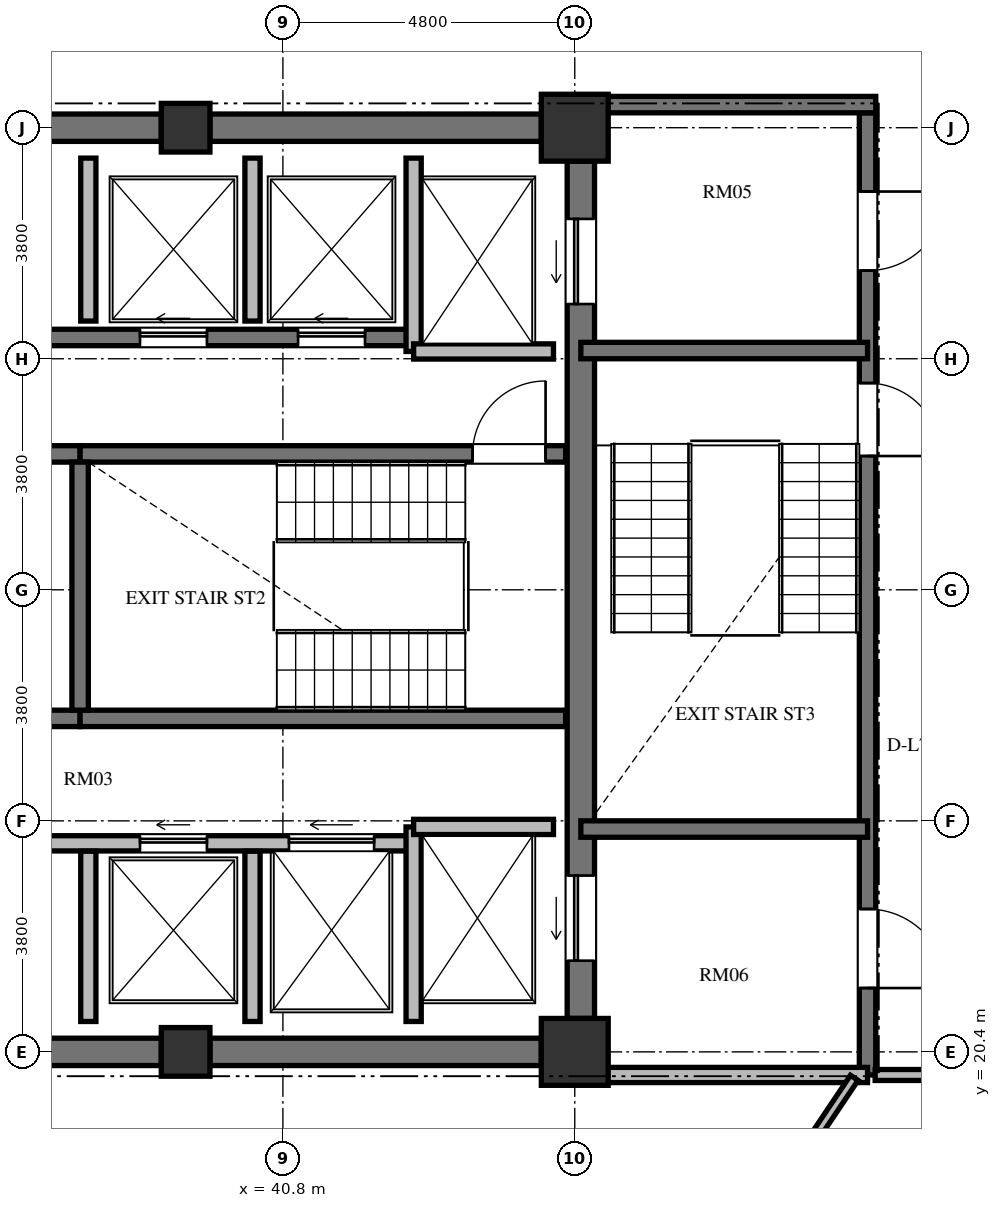
"""IFC4 building model, lengths in metres.
Left out: names, types, materials, properties, quantities, classifications, styles, units other than length and angle.
Written with IfcOpenShell. Run it as: python <this file> out.ifc"""

import sys

from ifc_helpers import new_model, si_unit, direction, frame, frame_2d, origin, origin_2d, place, context, subcontext, project, spatial, rectangle, extrude, element, fill, save


model = new_model("IFC4")
c1 = context("Model", 3, precision=1e-05, world=origin(), true_north=direction((0.0, 1.0)))
c2 = subcontext(c1, "Body", "Model", "MODEL_VIEW")
j1 = project(units=[si_unit("LENGTHUNIT", "METRE"), si_unit("PLANEANGLEUNIT", "RADIAN")], contexts=[c1])
p1 = place(None, origin())
s1 = spatial("IfcSite", under=j1, at=p1, CompositionType="ELEMENT")
p2 = place(p1, origin())
s2 = spatial("IfcBuilding", under=s1, at=p2, CompositionType="ELEMENT")
p3 = place(p2, frame((0.0, 0.0, 287.856)))
s3 = spatial("IfcBuildingStorey", under=s2, at=p3, CompositionType="ELEMENT", Elevation=287.856)
p4 = place(p3, frame((39.2, 20.4, 0.0), z_axis=(0.0, 0.0, 1.0), x_axis=(1.0, 0.0, 0.0)))
e1 = element("IfcColumn", 1, at=p4, inside=s3, PredefinedType="COLUMN", context=c2, shape_type="SweptSolid", body=[
    extrude(rectangle(XDim=0.8, YDim=0.8, at=origin_2d()), origin(), (0.0, 0.0, 1.0), 3.648),
])
for number, where, z_axis, x_axis in (
    (2, (45.6, 20.4, 0.0), (0.0, 0.0, 1.0), (1.0, 0.0, 0.0)),
    (3, (45.6, 35.6, 0.0), (0.0, 0.0, 1.0), (1.0, 0.0, 0.0)),
):
    element("IfcColumn", number, at=place(p3, frame(where, z_axis=z_axis, x_axis=x_axis)), inside=s3, PredefinedType="COLUMN", context=c2, shape_type="SweptSolid", body=[
        extrude(rectangle(XDim=1.1, YDim=1.1, at=origin_2d()), origin(), (0.0, 0.0, 1.0), 3.648),
    ])
p5 = place(p3, frame((39.2, 35.6, 0.0), z_axis=(0.0, 0.0, 1.0), x_axis=(1.0, 0.0, 0.0)))
e4 = element("IfcColumn", 4, at=p5, inside=s3, PredefinedType="COLUMN", context=c2, shape_type="SweptSolid", body=[
    extrude(rectangle(XDim=0.8, YDim=0.8, at=origin_2d()), origin(), (0.0, 0.0, 1.0), 3.648),
])
p6 = place(p3, frame((45.7, 20.95, 0.0), z_axis=(0.0, 0.0, 1.0), x_axis=(0.0, 1.0, 0.0)))
e5 = element("IfcWall", 5, at=p6, inside=s3, PredefinedType="SHEAR", context=c2, shape_type="SweptSolid", body=[
    extrude(rectangle(XDim=14.1, YDim=0.45, at=frame_2d((7.05, 0.0))), origin(), (0.0, 0.0, 1.0), 3.648),
])
p7 = place(p6, frame((11.75, 0.0, 0.0)))
e6 = element("IfcOpeningElement", 6, at=p7, cuts=e5, PredefinedType="OPENING", context=c2, shape_type="SweptSolid", body=[
    extrude(rectangle(XDim=1.4, YDim=2.3, at=frame_2d((0.7, 1.15))), frame((0.0, 0.235, 0.0), z_axis=(0.0, -1.0, 0.0), x_axis=(1.0, 0.0, 0.0)), (0.0, 0.0, 1.0), 0.47),
])
p8 = place(p6, frame((0.95, 0.0, 0.0)))
e7 = element("IfcOpeningElement", 7, at=p8, cuts=e5, PredefinedType="OPENING", context=c2, shape_type="SweptSolid", body=[
    extrude(rectangle(XDim=1.4, YDim=2.3, at=frame_2d((0.7, 1.15))), frame((0.0, 0.235, 0.0), z_axis=(0.0, -1.0, 0.0), x_axis=(1.0, 0.0, 0.0)), (0.0, 0.0, 1.0), 0.47),
])
for number, where, z_axis, x_axis in (
    (8, (33.2, 20.4, 0.0), (0.0, 0.0, 1.0), (1.0, 0.0, 0.0)),
    (9, (33.2, 35.6, 0.0), (0.0, 0.0, 1.0), (1.0, 0.0, 0.0)),
):
    element("IfcWall", number, at=place(p3, frame(where, z_axis=z_axis, x_axis=x_axis)), inside=s3, PredefinedType="SHEAR", context=c2, shape_type="SweptSolid", body=[
        extrude(rectangle(XDim=5.6, YDim=0.45, at=frame_2d((2.8, 0.0))), origin(), (0.0, 0.0, 1.0), 3.648),
    ])
for number, where, z_axis, x_axis in (
    (10, (39.6, 20.4, 0.0), (0.0, 0.0, 1.0), (1.0, 0.0, 0.0)),
    (11, (39.6, 35.6, 0.0), (0.0, 0.0, 1.0), (1.0, 0.0, 0.0)),
):
    element("IfcWall", number, at=place(p3, frame(where, z_axis=z_axis, x_axis=x_axis)), inside=s3, PredefinedType="SHEAR", context=c2, shape_type="SweptSolid", body=[
        extrude(rectangle(XDim=5.45, YDim=0.45, at=frame_2d((2.725, 0.0))), origin(), (0.0, 0.0, 1.0), 3.648),
    ])
p9 = place(p3, frame((34.535, 30.235, 0.0), z_axis=(0.0, 0.0, 1.0), x_axis=(1.0, 0.0, 0.0)))
e12 = element("IfcWall", 12, at=p9, inside=s3, PredefinedType="SHEAR", context=c2, shape_type="SweptSolid", body=[
    extrude(rectangle(XDim=2.93, YDim=0.27, at=frame_2d((1.465, 0.0))), origin(), (0.0, 0.0, 1.0), 3.648),
])
p10 = place(p9, frame((0.965, 0.0, 0.0)))
e13 = element("IfcOpeningElement", 13, at=p10, cuts=e12, PredefinedType="OPENING", context=c2, shape_type="SweptSolid", body=[
    extrude(rectangle(XDim=1.0, YDim=2.1, at=frame_2d((0.5, 1.05))), frame((0.0, 0.145, 0.0), z_axis=(0.0, -1.0, 0.0), x_axis=(1.0, 0.0, 0.0)), (0.0, 0.0, 1.0), 0.29),
])
p11 = place(p3, frame((37.465, 30.235, 0.0), z_axis=(0.0, 0.0, 1.0), x_axis=(1.0, 0.0, 0.0)))
e14 = element("IfcWall", 14, at=p11, inside=s3, PredefinedType="SHEAR", context=c2, shape_type="SweptSolid", body=[
    extrude(rectangle(XDim=7.985, YDim=0.27, at=frame_2d((3.992, 0.0))), origin(), (0.0, 0.0, 1.0), 3.648),
])
p12 = place(p11, frame((6.455, 0.0, 0.0)))
e15 = element("IfcOpeningElement", 15, at=p12, cuts=e14, PredefinedType="OPENING", context=c2, shape_type="SweptSolid", body=[
    extrude(rectangle(XDim=1.2, YDim=2.15, at=frame_2d((0.6, 1.075))), frame((0.0, 0.145, 0.0), z_axis=(0.0, -1.0, 0.0), x_axis=(1.0, 0.0, 0.0)), (0.0, 0.0, 1.0), 0.29),
])
p13 = place(p3, frame((34.535, 25.885, 0.0), z_axis=(0.0, 0.0, 1.0), x_axis=(1.0, 0.0, 0.0)))
e16 = element("IfcWall", 16, at=p13, inside=s3, PredefinedType="SHEAR", context=c2, shape_type="SweptSolid", body=[
    extrude(rectangle(XDim=2.93, YDim=0.27, at=frame_2d((1.465, 0.0))), origin(), (0.0, 0.0, 1.0), 3.648),
])
p14 = place(p3, frame((37.465, 25.885, 0.0), z_axis=(0.0, 0.0, 1.0), x_axis=(1.0, 0.0, 0.0)))
e17 = element("IfcWall", 17, at=p14, inside=s3, PredefinedType="SHEAR", context=c2, shape_type="SweptSolid", body=[
    extrude(rectangle(XDim=7.985, YDim=0.27, at=frame_2d((3.992, 0.0))), origin(), (0.0, 0.0, 1.0), 3.648),
])
p15 = place(p3, frame((37.465, 26.02, 0.0), z_axis=(0.0, 0.0, 1.0), x_axis=(0.0, 1.0, 0.0)))
e18 = element("IfcWall", 18, at=p15, inside=s3, PredefinedType="SHEAR", context=c2, shape_type="SweptSolid", body=[
    extrude(rectangle(XDim=4.08, YDim=0.27, at=frame_2d((2.04, 0.0))), origin(), (0.0, 0.0, 1.0), 3.648),
])
p16 = place(p3, frame((26.55, 32.15, 0.0), z_axis=(0.0, 0.0, 1.0), x_axis=(1.0, 0.0, 0.0)))
e19 = element("IfcWall", 19, at=p16, inside=s3, PredefinedType="SHEAR", context=c2, shape_type="SweptSolid", body=[
    extrude(rectangle(XDim=16.4, YDim=0.27, at=frame_2d((8.2, 0.0))), origin(), (0.0, 0.0, 1.0), 3.648),
])
p17 = place(p16, frame((5.125, 0.0, 0.0)))
e20 = element("IfcOpeningElement", 20, at=p17, cuts=e19, PredefinedType="OPENING", context=c2, shape_type="SweptSolid", body=[
    extrude(rectangle(XDim=1.05, YDim=2.15, at=frame_2d((0.525, 1.075))), frame((0.0, 0.145, 0.0), z_axis=(0.0, -1.0, 0.0), x_axis=(1.0, 0.0, 0.0)), (0.0, 0.0, 1.0), 0.29),
])
p18 = place(p16, frame((11.9, 0.0, 0.0)))
e21 = element("IfcOpeningElement", 21, at=p18, cuts=e19, PredefinedType="OPENING", context=c2, shape_type="SweptSolid", body=[
    extrude(rectangle(XDim=1.1, YDim=2.2, at=frame_2d((0.55, 1.1))), frame((0.0, 0.145, 0.0), z_axis=(0.0, -1.0, 0.0), x_axis=(1.0, 0.0, 0.0)), (0.0, 0.0, 1.0), 0.29),
])
p19 = place(p16, frame((14.5, 0.0, 0.0)))
e22 = element("IfcOpeningElement", 22, at=p19, cuts=e19, PredefinedType="OPENING", context=c2, shape_type="SweptSolid", body=[
    extrude(rectangle(XDim=1.1, YDim=2.2, at=frame_2d((0.55, 1.1))), frame((0.0, 0.145, 0.0), z_axis=(0.0, -1.0, 0.0), x_axis=(1.0, 0.0, 0.0)), (0.0, 0.0, 1.0), 0.29),
])
p20 = place(p3, frame((26.75, 23.83, 0.0), z_axis=(0.0, 0.0, 1.0), x_axis=(1.0, 0.0, 0.0)))
e23 = element("IfcWall", 23, at=p20, inside=s3, PredefinedType="SOLIDWALL", context=c2, shape_type="SweptSolid", body=[
    extrude(rectangle(XDim=16.2, YDim=0.25, at=frame_2d((8.1, 0.0))), origin(), (0.0, 0.0, 1.0), 3.448),
])
p21 = place(p20, frame((4.75, 0.0, 0.0)))
e24 = element("IfcOpeningElement", 24, at=p21, cuts=e23, PredefinedType="OPENING", context=c2, shape_type="SweptSolid", body=[
    extrude(rectangle(XDim=1.4, YDim=2.2, at=frame_2d((0.7, 1.1))), frame((0.0, 0.135, 0.0), z_axis=(0.0, -1.0, 0.0), x_axis=(1.0, 0.0, 0.0)), (0.0, 0.0, 1.0), 0.27),
])
p22 = place(p20, frame((11.7, 0.0, 0.0)))
e25 = element("IfcOpeningElement", 25, at=p22, cuts=e23, PredefinedType="OPENING", context=c2, shape_type="SweptSolid", body=[
    extrude(rectangle(XDim=1.1, YDim=2.2, at=frame_2d((0.55, 1.1))), frame((0.0, 0.135, 0.0), z_axis=(0.0, -1.0, 0.0), x_axis=(1.0, 0.0, 0.0)), (0.0, 0.0, 1.0), 0.27),
])
p23 = place(p20, frame((14.15, 0.0, 0.0)))
e26 = element("IfcOpeningElement", 26, at=p23, cuts=e23, PredefinedType="OPENING", context=c2, shape_type="SweptSolid", body=[
    extrude(rectangle(XDim=1.4, YDim=2.3, at=frame_2d((0.7, 1.15))), frame((0.0, 0.135, 0.0), z_axis=(0.0, -1.0, 0.0), x_axis=(1.0, 0.0, 0.0)), (0.0, 0.0, 1.0), 0.27),
])
p24 = place(p3, frame((42.95, 31.92, 0.0), z_axis=(0.0, 0.0, 1.0), x_axis=(0.0, 1.0, 0.0)))
e27 = element("IfcWall", 27, at=p24, inside=s3, PredefinedType="SOLIDWALL", context=c2, shape_type="SweptSolid", body=[
    extrude(rectangle(XDim=3.18, YDim=0.25, at=frame_2d((1.59, 0.0))), origin(), (0.0, 0.0, 1.0), 3.448),
])
p25 = place(p3, frame((42.95, 31.92, 0.0), z_axis=(0.0, 0.0, 1.0), x_axis=(1.0, 0.0, 0.0)))
e28 = element("IfcWall", 28, at=p25, inside=s3, PredefinedType="SOLIDWALL", context=c2, shape_type="SweptSolid", body=[
    extrude(rectangle(XDim=2.3, YDim=0.25, at=frame_2d((1.15, 0.0))), origin(), (0.0, 0.0, 1.0), 3.448),
])
p26 = place(p3, frame((42.95, 20.9, 0.0), z_axis=(0.0, 0.0, 1.0), x_axis=(0.0, 1.0, 0.0)))
e29 = element("IfcWall", 29, at=p26, inside=s3, PredefinedType="SOLIDWALL", context=c2, shape_type="SweptSolid", body=[
    extrude(rectangle(XDim=3.2, YDim=0.25, at=frame_2d((1.6, 0.0))), origin(), (0.0, 0.0, 1.0), 3.448),
])
p27 = place(p3, frame((42.95, 24.1, 0.0), z_axis=(0.0, 0.0, 1.0), x_axis=(1.0, 0.0, 0.0)))
e30 = element("IfcWall", 30, at=p27, inside=s3, PredefinedType="SOLIDWALL", context=c2, shape_type="SweptSolid", body=[
    extrude(rectangle(XDim=2.3, YDim=0.25, at=frame_2d((1.15, 0.0))), origin(), (0.0, 0.0, 1.0), 3.448),
])
p28 = place(p3, frame((37.6, 32.42, 0.0), z_axis=(0.0, 0.0, 1.0), x_axis=(0.0, 1.0, 0.0)))
e31 = element("IfcWall", 31, at=p28, inside=s3, PredefinedType="SOLIDWALL", context=c2, shape_type="SweptSolid", body=[
    extrude(rectangle(XDim=2.68, YDim=0.25, at=frame_2d((1.34, 0.0))), origin(), (0.0, 0.0, 1.0), 3.448),
])
p29 = place(p3, frame((37.6, 20.9, 0.0), z_axis=(0.0, 0.0, 1.0), x_axis=(0.0, 1.0, 0.0)))
e32 = element("IfcWall", 32, at=p29, inside=s3, PredefinedType="SOLIDWALL", context=c2, shape_type="SweptSolid", body=[
    extrude(rectangle(XDim=2.8, YDim=0.25, at=frame_2d((1.4, 0.0))), origin(), (0.0, 0.0, 1.0), 3.448),
])
p30 = place(p3, frame((40.3, 32.42, 0.0), z_axis=(0.0, 0.0, 1.0), x_axis=(0.0, 1.0, 0.0)))
e33 = element("IfcWall", 33, at=p30, inside=s3, PredefinedType="SOLIDWALL", context=c2, shape_type="SweptSolid", body=[
    extrude(rectangle(XDim=2.68, YDim=0.25, at=frame_2d((1.34, 0.0))), origin(), (0.0, 0.0, 1.0), 3.448),
])
p31 = place(p3, frame((40.3, 20.9, 0.0), z_axis=(0.0, 0.0, 1.0), x_axis=(0.0, 1.0, 0.0)))
e34 = element("IfcWall", 34, at=p31, inside=s3, PredefinedType="SOLIDWALL", context=c2, shape_type="SweptSolid", body=[
    extrude(rectangle(XDim=2.8, YDim=0.25, at=frame_2d((1.4, 0.0))), origin(), (0.0, 0.0, 1.0), 3.448),
])
p32 = place(p3, frame((50.415, 35.845, 0.0), z_axis=(0.0, 0.0, 1.0), x_axis=(0.0, -1.0, 0.0)))
e35 = element("IfcWall", 35, at=p32, inside=s3, PredefinedType="SHEAR", context=c2, shape_type="SweptSolid", body=[
    extrude(rectangle(XDim=15.825, YDim=0.27, at=frame_2d((7.913, 0.0))), origin(), (0.0, 0.0, 1.0), 3.648),
])
p33 = place(p32, frame((4.445, 0.0, 0.0)))
e36 = element("IfcOpeningElement", 36, at=p33, cuts=e35, PredefinedType="OPENING", context=c2, shape_type="SweptSolid", body=[
    extrude(rectangle(XDim=1.2, YDim=2.15, at=frame_2d((0.6, 1.075))), frame((0.0, 0.145, 0.0), z_axis=(0.0, -1.0, 0.0), x_axis=(1.0, 0.0, 0.0)), (0.0, 0.0, 1.0), 0.29),
])
p34 = place(p32, frame((1.295, 0.0, 0.0)))
e37 = element("IfcOpeningElement", 37, at=p34, cuts=e35, PredefinedType="OPENING", context=c2, shape_type="SweptSolid", body=[
    extrude(rectangle(XDim=1.3, YDim=2.2, at=frame_2d((0.65, 1.1))), frame((0.0, 0.145, 0.0), z_axis=(0.0, -1.0, 0.0), x_axis=(1.0, 0.0, 0.0)), (0.0, 0.0, 1.0), 0.29),
])
p35 = place(p32, frame((13.095, 0.0, 0.0)))
e38 = element("IfcOpeningElement", 38, at=p35, cuts=e35, PredefinedType="OPENING", context=c2, shape_type="SweptSolid", body=[
    extrude(rectangle(XDim=1.3, YDim=2.2, at=frame_2d((0.65, 1.1))), frame((0.0, 0.145, 0.0), z_axis=(0.0, -1.0, 0.0), x_axis=(1.0, 0.0, 0.0)), (0.0, 0.0, 1.0), 0.29),
])
p36 = place(p3, frame((45.925, 35.98, 0.0), z_axis=(0.0, 0.0, 1.0), x_axis=(1.0, 0.0, 0.0)))
e39 = element("IfcWall", 39, at=p36, inside=s3, PredefinedType="SHEAR", context=c2, shape_type="SweptSolid", body=[
    extrude(rectangle(XDim=4.625, YDim=0.27, at=frame_2d((2.312, 0.0))), origin(), (0.0, 0.0, 1.0), 3.648),
])
for number, where, z_axis, x_axis in (
    (40, (45.7, 31.935, 0.0), (0.0, 0.0, 1.0), (1.0, 0.0, 0.0)),
    (41, (45.7, 24.065, 0.0), (0.0, 0.0, 1.0), (1.0, 0.0, 0.0)),
):
    element("IfcWall", number, at=place(p3, frame(where, z_axis=z_axis, x_axis=x_axis)), inside=s3, PredefinedType="SHEAR", context=c2, shape_type="SweptSolid", body=[
        extrude(rectangle(XDim=4.715, YDim=0.27, at=frame_2d((2.357, 0.0))), origin(), (0.0, 0.0, 1.0), 3.648),
    ])
p37 = place(p3, frame((45.7, 20.02, 0.0), z_axis=(0.0, 0.0, 1.0), x_axis=(1.0, 0.0, 0.0)))
e42 = element("IfcWall", 42, at=p37, inside=s3, PredefinedType="SOLIDWALL", context=c2, shape_type="SweptSolid", body=[
    extrude(rectangle(XDim=4.715, YDim=0.25, at=frame_2d((2.357, 0.0))), origin(), (0.0, 0.0, 1.0), 3.448),
])
p38 = place(p3, frame((52.358, 20.02, 0.0), z_axis=(0.0, 0.0, 1.0), x_axis=(-1.0, 0.0, 0.0)))
e43 = element("IfcWall", 43, at=p38, inside=s3, PredefinedType="PARTITIONING", context=c2, shape_type="SweptSolid", body=[
    extrude(rectangle(XDim=1.818, YDim=0.18, at=frame_2d((0.909, 0.0))), origin(), (0.0, 0.0, 1.0), 3.448),
])
p39 = place(p3, frame((50.196, 19.973, 0.0), z_axis=(0.0, 0.0, 1.0), x_axis=(-0.557432490255, -0.830222270725, 0.0)))
e44 = element("IfcWall", 44, at=p39, inside=s3, PredefinedType="PARTITIONING", context=c2, shape_type="SweptSolid", body=[
    extrude(rectangle(XDim=5.664, YDim=0.15, at=frame_2d((2.832, 0.0))), origin(), (0.0, 0.0, 1.0), 3.448),
])
p40 = place(p12, origin())
e45 = element("IfcDoor", 45, at=p40, inside=s3, OperationType="SINGLE_SWING_RIGHT", PredefinedType="DOOR", context=c2, shape_type="SweptSolid", body=[
    extrude(rectangle(XDim=1.2, YDim=2.15, at=frame_2d((0.6, 1.075))), frame((0.0, 0.025, 0.0), z_axis=(0.0, -1.0, 0.0), x_axis=(1.0, 0.0, 0.0)), (0.0, 0.0, 1.0), 0.05),
])
fill(e15, e45)
p41 = place(p18, origin())
e46 = element("IfcDoor", 46, at=p41, inside=s3, OperationType="SLIDING_TO_LEFT", PredefinedType="DOOR", context=c2, shape_type="SweptSolid", body=[
    extrude(rectangle(XDim=1.1, YDim=2.2, at=frame_2d((0.55, 1.1))), frame((0.0, 0.025, 0.0), z_axis=(0.0, -1.0, 0.0), x_axis=(1.0, 0.0, 0.0)), (0.0, 0.0, 1.0), 0.05),
])
fill(e21, e46)
p42 = place(p19, origin())
e47 = element("IfcDoor", 47, at=p42, inside=s3, OperationType="SLIDING_TO_LEFT", PredefinedType="DOOR", context=c2, shape_type="SweptSolid", body=[
    extrude(rectangle(XDim=1.1, YDim=2.2, at=frame_2d((0.55, 1.1))), frame((0.0, 0.025, 0.0), z_axis=(0.0, -1.0, 0.0), x_axis=(1.0, 0.0, 0.0)), (0.0, 0.0, 1.0), 0.05),
])
fill(e22, e47)
p43 = place(p22, origin())
e48 = element("IfcDoor", 48, at=p43, inside=s3, OperationType="SLIDING_TO_LEFT", PredefinedType="DOOR", context=c2, shape_type="SweptSolid", body=[
    extrude(rectangle(XDim=1.1, YDim=2.2, at=frame_2d((0.55, 1.1))), frame((0.0, 0.025, 0.0), z_axis=(0.0, -1.0, 0.0), x_axis=(1.0, 0.0, 0.0)), (0.0, 0.0, 1.0), 0.05),
])
fill(e25, e48)
p44 = place(p7, origin())
e49 = element("IfcDoor", 49, at=p44, inside=s3, OperationType="SLIDING_TO_LEFT", PredefinedType="DOOR", context=c2, shape_type="SweptSolid", body=[
    extrude(rectangle(XDim=1.4, YDim=2.3, at=frame_2d((0.7, 1.15))), frame((0.0, 0.025, 0.0), z_axis=(0.0, -1.0, 0.0), x_axis=(1.0, 0.0, 0.0)), (0.0, 0.0, 1.0), 0.05),
])
fill(e6, e49)
p45 = place(p8, origin())
e50 = element("IfcDoor", 50, at=p45, inside=s3, OperationType="SLIDING_TO_LEFT", PredefinedType="DOOR", context=c2, shape_type="SweptSolid", body=[
    extrude(rectangle(XDim=1.4, YDim=2.3, at=frame_2d((0.7, 1.15))), frame((0.0, 0.025, 0.0), z_axis=(0.0, -1.0, 0.0), x_axis=(1.0, 0.0, 0.0)), (0.0, 0.0, 1.0), 0.05),
])
fill(e7, e50)
p46 = place(p23, origin())
e51 = element("IfcDoor", 51, at=p46, inside=s3, OperationType="SLIDING_TO_LEFT", PredefinedType="DOOR", context=c2, shape_type="SweptSolid", body=[
    extrude(rectangle(XDim=1.4, YDim=2.3, at=frame_2d((0.7, 1.15))), frame((0.0, 0.025, 0.0), z_axis=(0.0, -1.0, 0.0), x_axis=(1.0, 0.0, 0.0)), (0.0, 0.0, 1.0), 0.05),
])
fill(e26, e51)
p47 = place(p33, origin())
e52 = element("IfcDoor", 52, at=p47, inside=s3, OperationType="SINGLE_SWING_RIGHT", PredefinedType="DOOR", context=c2, shape_type="SweptSolid", body=[
    extrude(rectangle(XDim=1.2, YDim=2.15, at=frame_2d((0.6, 1.075))), frame((0.0, 0.025, 0.0), z_axis=(0.0, -1.0, 0.0), x_axis=(1.0, 0.0, 0.0)), (0.0, 0.0, 1.0), 0.05),
])
fill(e36, e52)
p48 = place(p34, origin())
e53 = element("IfcDoor", 53, at=p48, inside=s3, OperationType="SINGLE_SWING_LEFT", PredefinedType="DOOR", context=c2, shape_type="SweptSolid", body=[
    extrude(rectangle(XDim=1.3, YDim=2.2, at=frame_2d((0.65, 1.1))), frame((0.0, 0.025, 0.0), z_axis=(0.0, -1.0, 0.0), x_axis=(1.0, 0.0, 0.0)), (0.0, 0.0, 1.0), 0.05),
])
fill(e37, e53)
p49 = place(p35, origin())
e54 = element("IfcDoor", 54, at=p49, inside=s3, OperationType="SINGLE_SWING_RIGHT", PredefinedType="DOOR", context=c2, shape_type="SweptSolid", body=[
    extrude(rectangle(XDim=1.3, YDim=2.2, at=frame_2d((0.65, 1.1))), frame((0.0, 0.025, 0.0), z_axis=(0.0, -1.0, 0.0), x_axis=(1.0, 0.0, 0.0)), (0.0, 0.0, 1.0), 0.05),
])
fill(e38, e54)
save(model, sys.argv[1])
